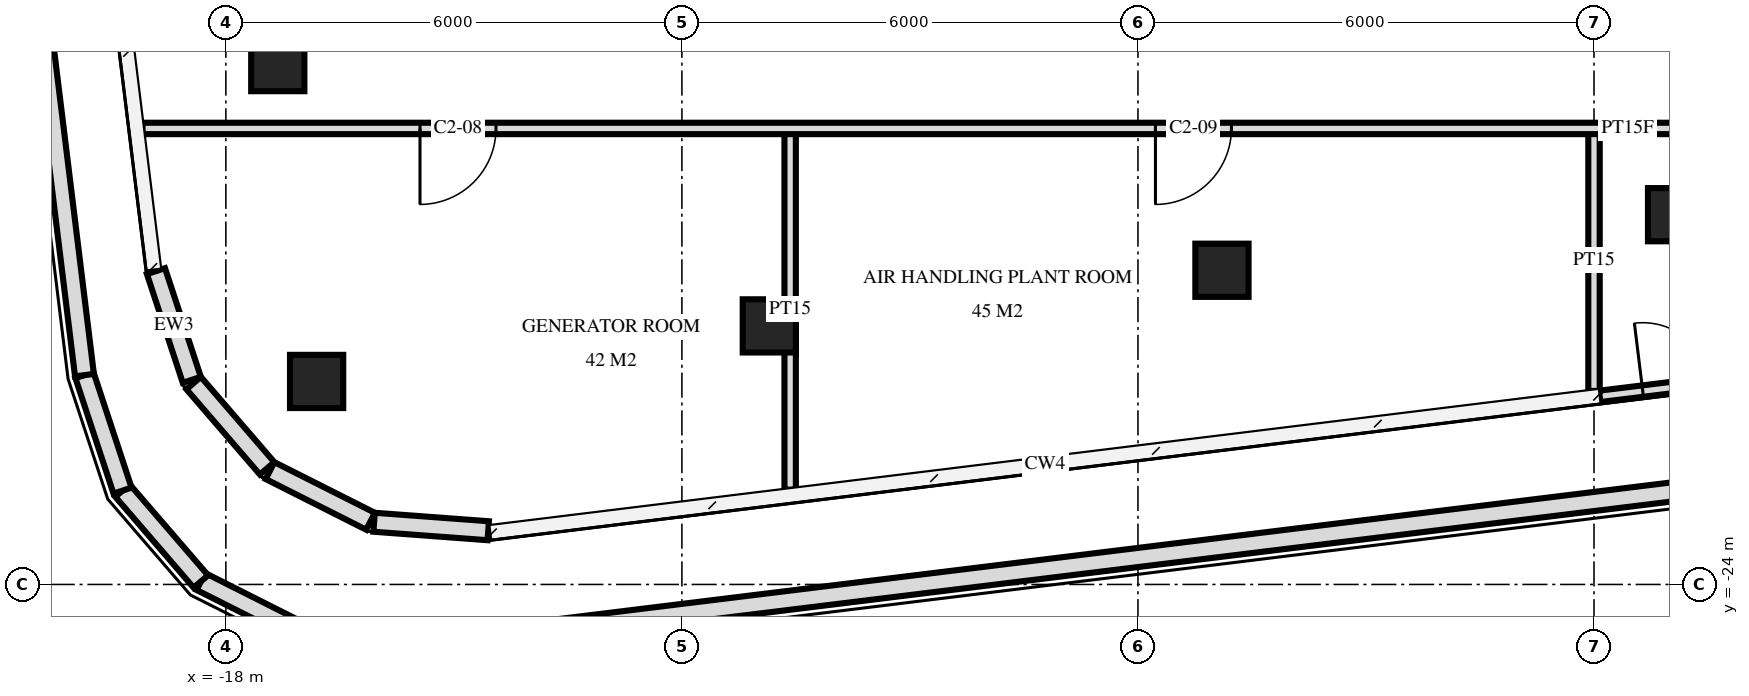
"""IFC4 building model, lengths in metres.
Left out: names, types, materials, properties, quantities, classifications, styles, units other than length and angle.
Written with IfcOpenShell. Run it as: python <this file> out.ifc"""

import sys

from ifc_helpers import new_model, si_unit, direction, frame, frame_2d, origin, origin_2d, place, context, subcontext, project, spatial, rectangle, extrude, element, fill, save


model = new_model("IFC4")
c1 = context("Model", 3, precision=1e-05, world=origin(), true_north=direction((0.0, 1.0)))
c2 = subcontext(c1, "Body", "Model", "MODEL_VIEW")
j1 = project(units=[si_unit("LENGTHUNIT", "METRE"), si_unit("PLANEANGLEUNIT", "RADIAN")], contexts=[c1])
p1 = place(None, origin())
s1 = spatial("IfcSite", under=j1, at=p1, CompositionType="ELEMENT")
p2 = place(p1, origin())
s2 = spatial("IfcBuilding", under=s1, at=p2, CompositionType="ELEMENT")
p3 = place(p2, frame((0.0, 0.0, 350.2)))
s3 = spatial("IfcBuildingStorey", under=s2, at=p3, CompositionType="ELEMENT", Elevation=350.2)
for number, where, z_axis, x_axis in (
    (1, (-17.317, -17.16, 0.0), (0.0, 0.0, 1.0), (1.0, 0.0, 0.0)),
    (2, (-16.806, -21.329, 0.0), (0.0, 0.0, 1.0), (1.0, 0.0, 0.0)),
    (3, (-10.85, -20.598, 0.0), (0.0, 0.0, 1.0), (1.0, 0.0, 0.0)),
    (4, (-4.895, -19.866, 0.0), (0.0, 0.0, 1.0), (1.0, 0.0, 0.0)),
    (5, (1.06, -19.135, 0.0), (0.0, 0.0, 1.0), (1.0, 0.0, 0.0)),
):
    element("IfcColumn", number, at=place(p3, frame(where, z_axis=z_axis, x_axis=x_axis)), inside=s3, PredefinedType="COLUMN", context=c2, shape_type="SweptSolid", body=[
        extrude(rectangle(XDim=0.7, YDim=0.7, at=origin_2d()), origin(), (0.0, 0.0, 1.0), 3.6),
    ])
p4 = place(p3, frame((-18.92, -19.878, 0.0), z_axis=(0.0, 0.0, 1.0), x_axis=(0.31321078528, -0.94968363363, 0.0)))
e6 = element("IfcWall", 6, at=p4, inside=s3, PredefinedType="SOLIDWALL", context=c2, shape_type="SweptSolid", body=[
    extrude(rectangle(XDim=1.506, YDim=0.25, at=frame_2d((0.753, 0.0))), origin(), (0.0, 0.0, 1.0), 3.32),
])
p5 = place(p3, frame((-18.424, -21.35, 0.0), z_axis=(0.0, 0.0, 1.0), x_axis=(0.65281239985, -0.757519617305, 0.0)))
e7 = element("IfcWall", 7, at=p5, inside=s3, PredefinedType="SOLIDWALL", context=c2, shape_type="SweptSolid", body=[
    extrude(rectangle(XDim=1.481, YDim=0.25, at=frame_2d((0.74, 0.0))), origin(), (0.0, 0.0, 1.0), 3.32),
])
p6 = place(p3, frame((-17.419, -22.502, 0.0), z_axis=(0.0, 0.0, 1.0), x_axis=(0.893004966714, -0.450046808036, 0.0)))
e8 = element("IfcWall", 8, at=p6, inside=s3, PredefinedType="SOLIDWALL", context=c2, shape_type="SweptSolid", body=[
    extrude(rectangle(XDim=1.481, YDim=0.25, at=frame_2d((0.74, 0.0))), origin(), (0.0, 0.0, 1.0), 3.32),
])
p7 = place(p3, frame((-16.05, -23.182, 0.0), z_axis=(0.0, 0.0, 1.0), x_axis=(0.997251362315, -0.074092647143, 0.0)))
e9 = element("IfcWall", 9, at=p7, inside=s3, PredefinedType="SOLIDWALL", context=c2, shape_type="SweptSolid", body=[
    extrude(rectangle(XDim=1.506, YDim=0.25, at=frame_2d((0.753, 0.0))), origin(), (0.0, 0.0, 1.0), 3.32),
])
p8 = place(p3, frame((0.075, -21.525, 0.0), z_axis=(0.0, 0.0, 1.0), x_axis=(0.992547507053, 0.121858303952, 0.0)))
e10 = element("IfcWall", 10, at=p8, inside=s3, PredefinedType="USERDEFINED", context=c2, shape_type="SweptSolid", body=[
    extrude(rectangle(XDim=2.941, YDim=0.15, at=frame_2d((1.471, 0.0))), origin(), (0.0, 0.0, 1.0), 3.32),
])
p9 = place(p8, frame((0.571, 0.0, 0.0)))
e11 = element("IfcOpeningElement", 11, at=p9, cuts=e10, PredefinedType="OPENING", context=c2, shape_type="SweptSolid", body=[
    extrude(rectangle(XDim=1.8, YDim=2.4, at=frame_2d((0.9, 1.2))), frame((0.0, 0.085, 0.0), z_axis=(0.0, -1.0, 0.0), x_axis=(1.0, 0.0, 0.0)), (0.0, 0.0, 1.0), 0.17),
])
p10 = place(p3, frame((18.531, -20.633, 0.0), z_axis=(0.0, 0.0, 1.0), x_axis=(-0.992546721183, -0.121864704768, 0.0)))
e12 = element("IfcWall", 12, at=p10, inside=s3, PredefinedType="PARAPET", context=c2, shape_type="SweptSolid", body=[
    extrude(rectangle(XDim=34.109, YDim=0.25, at=frame_2d((17.055, 0.0))), origin(), (0.0, 0.0, 1.0), 1.1),
])
p11 = place(p3, frame((-16.92, -24.671, 0.0), z_axis=(0.0, 0.0, 1.0), x_axis=(-0.892999307843, 0.450058036472, 0.0)))
e13 = element("IfcWall", 13, at=p11, inside=s3, PredefinedType="PARAPET", context=c2, shape_type="SweptSolid", body=[
    extrude(rectangle(XDim=1.578, YDim=0.25, at=frame_2d((0.789, 0.0))), origin(), (0.0, 0.0, 1.0), 1.1),
])
p12 = place(p3, frame((-18.329, -23.961, 0.0), z_axis=(0.0, 0.0, 1.0), x_axis=(-0.652725415359, 0.75759456977, 0.0)))
e14 = element("IfcWall", 14, at=p12, inside=s3, PredefinedType="PARAPET", context=c2, shape_type="SweptSolid", body=[
    extrude(rectangle(XDim=1.578, YDim=0.25, at=frame_2d((0.789, 0.0))), origin(), (0.0, 0.0, 1.0), 1.1),
])
p13 = place(p3, frame((-19.36, -22.765, 0.0), z_axis=(0.0, 0.0, 1.0), x_axis=(-0.313113242009, 0.949715798373, 0.0)))
e15 = element("IfcWall", 15, at=p13, inside=s3, PredefinedType="PARAPET", context=c2, shape_type="SweptSolid", body=[
    extrude(rectangle(XDim=1.6, YDim=0.25, at=frame_2d((0.8, 0.0))), origin(), (0.0, 0.0, 1.0), 1.1),
])
p14 = place(p3, frame((-19.861, -21.246, 0.0), z_axis=(0.0, 0.0, 1.0), x_axis=(-0.121871564083, 0.992545878974, 0.0)))
e16 = element("IfcWall", 16, at=p14, inside=s3, PredefinedType="PARAPET", context=c2, shape_type="SweptSolid", body=[
    extrude(rectangle(XDim=18.172, YDim=0.25, at=frame_2d((9.086, 0.0))), origin(), (0.0, 0.0, 1.0), 1.1),
])
p15 = place(p3, frame((0.0, -21.454, 0.0), z_axis=(0.0, 0.0, 1.0), x_axis=(0.0, 1.0, 0.0)))
e17 = element("IfcWall", 17, at=p15, inside=s3, PredefinedType="PARTITIONING", context=c2, shape_type="SweptSolid", body=[
    extrude(rectangle(XDim=3.454, YDim=0.15, at=frame_2d((1.727, 0.0))), origin(), (0.0, 0.0, 1.0), 3.32),
])
p16 = place(p3, frame((-10.576, -22.752, 0.0), z_axis=(0.0, 0.0, 1.0), x_axis=(0.0, 1.0, 0.0)))
e18 = element("IfcWall", 18, at=p16, inside=s3, PredefinedType="PARTITIONING", context=c2, shape_type="SweptSolid", body=[
    extrude(rectangle(XDim=4.752, YDim=0.15, at=frame_2d((2.376, 0.0))), origin(), (0.0, 0.0, 1.0), 3.32),
])
p17 = place(p3, frame((-19.097, -18.0, 0.0), z_axis=(0.0, 0.0, 1.0), x_axis=(1.0, 0.0, 0.0)))
e19 = element("IfcWall", 19, at=p17, inside=s3, PredefinedType="PARTITIONING", context=c2, shape_type="SweptSolid", body=[
    extrude(rectangle(XDim=39.081, YDim=0.15, at=frame_2d((19.541, 0.0))), origin(), (0.0, 0.0, 1.0), 3.32),
])
p18 = place(p17, frame((3.651, 0.0, 0.0)))
e20 = element("IfcOpeningElement", 20, at=p18, cuts=e19, PredefinedType="OPENING", context=c2, shape_type="SweptSolid", body=[
    extrude(rectangle(XDim=1.0, YDim=2.1, at=frame_2d((0.5, 1.05))), frame((0.0, 0.085, 0.0), z_axis=(0.0, -1.0, 0.0), x_axis=(1.0, 0.0, 0.0)), (0.0, 0.0, 1.0), 0.17),
])
p19 = place(p17, frame((13.327, 0.0, 0.0)))
e21 = element("IfcOpeningElement", 21, at=p19, cuts=e19, PredefinedType="OPENING", context=c2, shape_type="SweptSolid", body=[
    extrude(rectangle(XDim=1.0, YDim=2.1, at=frame_2d((0.5, 1.05))), frame((0.0, 0.085, 0.0), z_axis=(0.0, -1.0, 0.0), x_axis=(1.0, 0.0, 0.0)), (0.0, 0.0, 1.0), 0.17),
])
p20 = place(p17, frame((23.903, 0.0, 0.0)))
e22 = element("IfcOpeningElement", 22, at=p20, cuts=e19, PredefinedType="OPENING", context=c2, shape_type="SweptSolid", body=[
    extrude(rectangle(XDim=1.0, YDim=2.1, at=frame_2d((0.5, 1.05))), frame((0.0, 0.085, 0.0), z_axis=(0.0, -1.0, 0.0), x_axis=(1.0, 0.0, 0.0)), (0.0, 0.0, 1.0), 0.17),
])
p21 = place(p17, frame((34.037, 0.0, 0.0)))
e23 = element("IfcOpeningElement", 23, at=p21, cuts=e19, PredefinedType="OPENING", context=c2, shape_type="SweptSolid", body=[
    extrude(rectangle(XDim=1.0, YDim=2.1, at=frame_2d((0.5, 1.05))), frame((0.0, 0.085, 0.0), z_axis=(0.0, -1.0, 0.0), x_axis=(1.0, 0.0, 0.0)), (0.0, 0.0, 1.0), 0.17),
])
p22 = place(p9, origin())
e24 = element("IfcDoor", 24, at=p22, inside=s3, OperationType="DOUBLE_DOOR_SINGLE_SWING", PredefinedType="DOOR", context=c2, shape_type="SweptSolid", body=[
    extrude(rectangle(XDim=1.8, YDim=2.4, at=frame_2d((0.9, 1.2))), frame((0.0, 0.025, 0.0), z_axis=(0.0, -1.0, 0.0), x_axis=(1.0, 0.0, 0.0)), (0.0, 0.0, 1.0), 0.05),
])
fill(e11, e24)
p23 = place(p18, frame((0.5, 0.0, 0.0), z_axis=(0.0, 0.0, 1.0), x_axis=(-1.0, 0.0, 0.0)))
e25 = element("IfcDoor", 25, at=p23, inside=s3, OperationType="SINGLE_SWING_LEFT", PredefinedType="DOOR", context=c2, shape_type="SweptSolid", body=[
    extrude(rectangle(XDim=1.0, YDim=2.1, at=frame_2d((0.0, 1.05))), frame((0.0, -0.025, 0.0), z_axis=(0.0, 1.0, 0.0), x_axis=(-1.0, 0.0, 0.0)), (0.0, 0.0, 1.0), 0.05),
])
fill(e20, e25)
p24 = place(p19, frame((0.5, 0.0, 0.0), z_axis=(0.0, 0.0, 1.0), x_axis=(-1.0, 0.0, 0.0)))
e26 = element("IfcDoor", 26, at=p24, inside=s3, OperationType="SINGLE_SWING_LEFT", PredefinedType="DOOR", context=c2, shape_type="SweptSolid", body=[
    extrude(rectangle(XDim=1.0, YDim=2.1, at=frame_2d((0.0, 1.05))), frame((0.0, -0.025, 0.0), z_axis=(0.0, 1.0, 0.0), x_axis=(-1.0, 0.0, 0.0)), (0.0, 0.0, 1.0), 0.05),
])
fill(e21, e26)
save(model, sys.argv[1])
